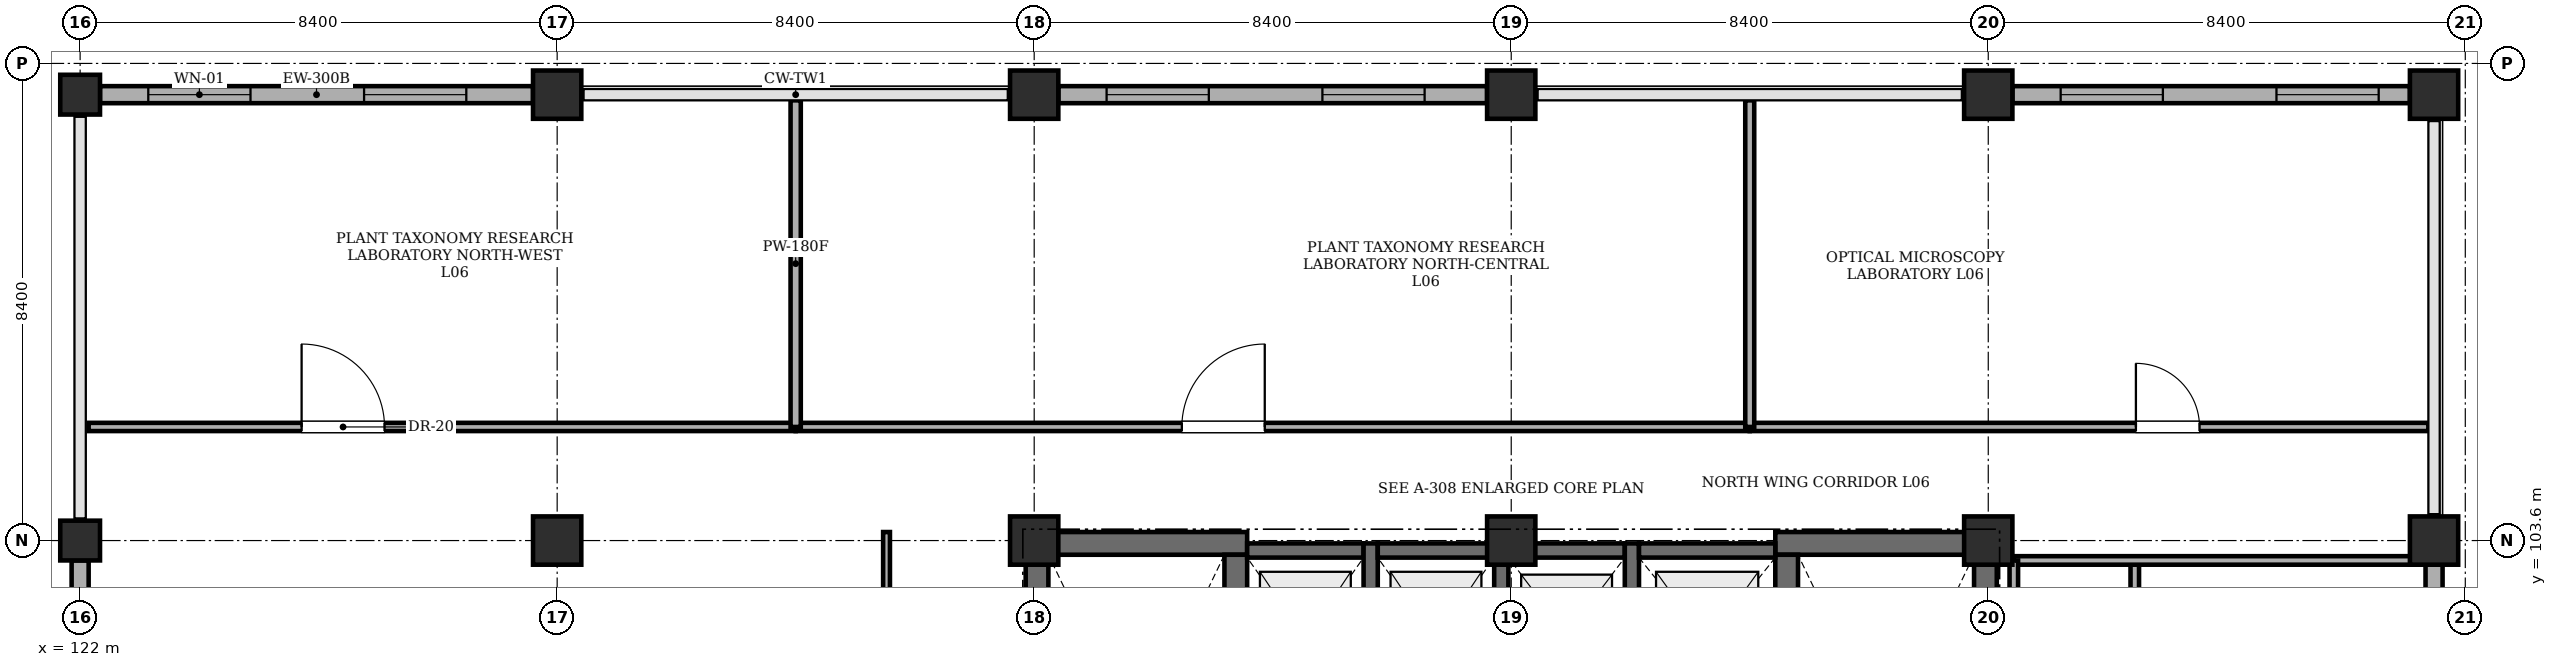
"""IFC4 building model, lengths in metres.
Left out: names, types, materials, properties, quantities, classifications, styles, units other than length and angle.
Written with IfcOpenShell. Run it as: python <this file> out.ifc"""

import sys

from ifc_helpers import new_model, si_unit, direction, frame, frame_2d, origin, origin_2d, place, context, subcontext, project, spatial, rectangle, extrude, element, fill, save


model = new_model("IFC4")
c1 = context("Model", 3, precision=1e-05, world=origin(), true_north=direction((0.0, 1.0)))
c2 = subcontext(c1, "Body", "Model", "MODEL_VIEW")
j1 = project(units=[si_unit("LENGTHUNIT", "METRE"), si_unit("PLANEANGLEUNIT", "RADIAN")], contexts=[c1])
p1 = place(None, origin())
s1 = spatial("IfcSite", under=j1, at=p1, CompositionType="ELEMENT")
p2 = place(p1, origin())
s2 = spatial("IfcBuilding", under=s1, at=p2, CompositionType="ELEMENT")
p3 = place(p2, frame((0.0, 0.0, 23.4)))
s3 = spatial("IfcBuildingStorey", under=s2, at=p3, CompositionType="ELEMENT", Elevation=23.4)
for number, where, z_axis, x_axis in (
    (1, (122.0, 103.6, 0.0), (0.0, 0.0, 1.0), (1.0, 0.0, 0.0)),
    (2, (122.0, 111.45, 0.0), (0.0, 0.0, 1.0), (1.0, 0.0, 0.0)),
):
    element("IfcColumn", number, at=place(p3, frame(where, z_axis=z_axis, x_axis=x_axis)), inside=s3, PredefinedType="COLUMN", context=c2, shape_type="SweptSolid", body=[
        extrude(rectangle(XDim=0.7, YDim=0.7, at=origin_2d()), origin(), (0.0, 0.0, 1.0), 4.0),
    ])
for number, where, z_axis, x_axis in (
    (3, (130.4, 103.6, 0.0), (0.0, 0.0, 1.0), (1.0, 0.0, 0.0)),
    (4, (130.4, 111.45, 0.0), (0.0, 0.0, 1.0), (1.0, 0.0, 0.0)),
    (5, (138.8, 103.6, 0.0), (0.0, 0.0, 1.0), (1.0, 0.0, 0.0)),
    (6, (138.8, 111.45, 0.0), (0.0, 0.0, 1.0), (1.0, 0.0, 0.0)),
    (7, (147.2, 103.6, 0.0), (0.0, 0.0, 1.0), (1.0, 0.0, 0.0)),
    (8, (147.2, 111.45, 0.0), (0.0, 0.0, 1.0), (1.0, 0.0, 0.0)),
    (9, (155.6, 103.6, 0.0), (0.0, 0.0, 1.0), (1.0, 0.0, 0.0)),
    (10, (155.6, 111.45, 0.0), (0.0, 0.0, 1.0), (1.0, 0.0, 0.0)),
    (11, (163.45, 103.6, 0.0), (0.0, 0.0, 1.0), (1.0, 0.0, 0.0)),
    (12, (163.45, 111.45, 0.0), (0.0, 0.0, 1.0), (1.0, 0.0, 0.0)),
):
    element("IfcColumn", number, at=place(p3, frame(where, z_axis=z_axis, x_axis=x_axis)), inside=s3, PredefinedType="COLUMN", context=c2, shape_type="SweptSolid", body=[
        extrude(rectangle(XDim=0.85, YDim=0.85, at=origin_2d()), origin(), (0.0, 0.0, 1.0), 4.0),
    ])
p4 = place(p3, frame((138.65, 103.55, 0.0), z_axis=(0.0, 0.0, 1.0), x_axis=(1.0, 0.0, 0.0)))
e13 = element("IfcWall", 13, at=p4, inside=s3, PredefinedType="SHEAR", context=c2, shape_type="SweptSolid", body=[
    extrude(rectangle(XDim=3.9, YDim=0.4, at=frame_2d((1.95, 0.0))), origin(), (0.0, 0.0, 1.0), 4.0),
])
p5 = place(p3, frame((138.85, 95.45, 0.0), z_axis=(0.0, 0.0, 1.0), x_axis=(0.0, 1.0, 0.0)))
e14 = element("IfcWall", 14, at=p5, inside=s3, PredefinedType="SHEAR", context=c2, shape_type="SweptSolid", body=[
    extrude(rectangle(XDim=7.9, YDim=0.4, at=frame_2d((3.95, 0.0))), origin(), (0.0, 0.0, 1.0), 4.0),
])
p6 = place(p3, frame((142.35, 95.45, 0.0), z_axis=(0.0, 0.0, 1.0), x_axis=(0.0, 1.0, 0.0)))
e15 = element("IfcWall", 15, at=p6, inside=s3, PredefinedType="SHEAR", context=c2, shape_type="SweptSolid", body=[
    extrude(rectangle(XDim=7.9, YDim=0.4, at=frame_2d((3.95, 0.0))), origin(), (0.0, 0.0, 1.0), 4.0),
])
p7 = place(p6, frame((0.22, 0.0, 0.0)))
e16 = element("IfcOpeningElement", 16, at=p7, cuts=e15, PredefinedType="OPENING", context=c2, shape_type="SweptSolid", body=[
    extrude(rectangle(XDim=1.15, YDim=2.15, at=frame_2d((0.575, 1.075))), frame((0.0, 0.21, 0.0), z_axis=(0.0, -1.0, 0.0), x_axis=(1.0, 0.0, 0.0)), (0.0, 0.0, 1.0), 0.42),
])
p8 = place(p3, frame((151.85, 103.55, 0.0), z_axis=(0.0, 0.0, 1.0), x_axis=(1.0, 0.0, 0.0)))
e17 = element("IfcWall", 17, at=p8, inside=s3, PredefinedType="SHEAR", context=c2, shape_type="SweptSolid", body=[
    extrude(rectangle(XDim=3.9, YDim=0.4, at=frame_2d((1.95, 0.0))), origin(), (0.0, 0.0, 1.0), 4.0),
])
p9 = place(p3, frame((152.05, 95.45, 0.0), z_axis=(0.0, 0.0, 1.0), x_axis=(0.0, 1.0, 0.0)))
e18 = element("IfcWall", 18, at=p9, inside=s3, PredefinedType="SHEAR", context=c2, shape_type="SweptSolid", body=[
    extrude(rectangle(XDim=7.9, YDim=0.4, at=frame_2d((3.95, 0.0))), origin(), (0.0, 0.0, 1.0), 4.0),
])
p10 = place(p9, frame((0.35, 0.0, 0.0)))
e19 = element("IfcOpeningElement", 19, at=p10, cuts=e18, PredefinedType="OPENING", context=c2, shape_type="SweptSolid", body=[
    extrude(rectangle(XDim=1.15, YDim=2.15, at=frame_2d((0.575, 1.075))), frame((0.0, 0.21, 0.0), z_axis=(0.0, -1.0, 0.0), x_axis=(1.0, 0.0, 0.0)), (0.0, 0.0, 1.0), 0.42),
])
p11 = place(p3, frame((155.55, 95.45, 0.0), z_axis=(0.0, 0.0, 1.0), x_axis=(0.0, 1.0, 0.0)))
e20 = element("IfcWall", 20, at=p11, inside=s3, PredefinedType="SHEAR", context=c2, shape_type="SweptSolid", body=[
    extrude(rectangle(XDim=7.9, YDim=0.4, at=frame_2d((3.95, 0.0))), origin(), (0.0, 0.0, 1.0), 4.0),
])
p12 = place(p3, frame((142.55, 103.425, 0.0), z_axis=(0.0, 0.0, 1.0), x_axis=(1.0, 0.0, 0.0)))
e21 = element("IfcWall", 21, at=p12, inside=s3, PredefinedType="SHEAR", context=c2, shape_type="SweptSolid", body=[
    extrude(rectangle(XDim=2.05, YDim=0.25, at=frame_2d((1.025, 0.0))), origin(), (0.0, 0.0, 1.0), 4.0),
])
p13 = place(p3, frame((144.725, 100.15, 0.0), z_axis=(0.0, 0.0, 1.0), x_axis=(0.0, 1.0, 0.0)))
e22 = element("IfcWall", 22, at=p13, inside=s3, PredefinedType="SHEAR", context=c2, shape_type="SweptSolid", body=[
    extrude(rectangle(XDim=3.4, YDim=0.25, at=frame_2d((1.7, 0.0))), origin(), (0.0, 0.0, 1.0), 4.0),
])
p14 = place(p3, frame((144.85, 103.425, 0.0), z_axis=(0.0, 0.0, 1.0), x_axis=(1.0, 0.0, 0.0)))
e23 = element("IfcWall", 23, at=p14, inside=s3, PredefinedType="SHEAR", context=c2, shape_type="SweptSolid", body=[
    extrude(rectangle(XDim=2.05, YDim=0.25, at=frame_2d((1.025, 0.0))), origin(), (0.0, 0.0, 1.0), 4.0),
])
p15 = place(p3, frame((147.025, 100.15, 0.0), z_axis=(0.0, 0.0, 1.0), x_axis=(0.0, 1.0, 0.0)))
e24 = element("IfcWall", 24, at=p15, inside=s3, PredefinedType="SHEAR", context=c2, shape_type="SweptSolid", body=[
    extrude(rectangle(XDim=3.4, YDim=0.25, at=frame_2d((1.7, 0.0))), origin(), (0.0, 0.0, 1.0), 4.0),
])
p16 = place(p3, frame((147.15, 103.425, 0.0), z_axis=(0.0, 0.0, 1.0), x_axis=(1.0, 0.0, 0.0)))
e25 = element("IfcWall", 25, at=p16, inside=s3, PredefinedType="SHEAR", context=c2, shape_type="SweptSolid", body=[
    extrude(rectangle(XDim=2.05, YDim=0.25, at=frame_2d((1.025, 0.0))), origin(), (0.0, 0.0, 1.0), 4.0),
])
p17 = place(p3, frame((149.325, 100.35, 0.0), z_axis=(0.0, 0.0, 1.0), x_axis=(0.0, 1.0, 0.0)))
e26 = element("IfcWall", 26, at=p17, inside=s3, PredefinedType="SHEAR", context=c2, shape_type="SweptSolid", body=[
    extrude(rectangle(XDim=3.2, YDim=0.25, at=frame_2d((1.6, 0.0))), origin(), (0.0, 0.0, 1.0), 4.0),
])
p18 = place(p3, frame((149.45, 103.425, 0.0), z_axis=(0.0, 0.0, 1.0), x_axis=(1.0, 0.0, 0.0)))
e27 = element("IfcWall", 27, at=p18, inside=s3, PredefinedType="SHEAR", context=c2, shape_type="SweptSolid", body=[
    extrude(rectangle(XDim=2.4, YDim=0.25, at=frame_2d((1.2, 0.0))), origin(), (0.0, 0.0, 1.0), 4.0),
])
p19 = place(p3, frame((122.35, 111.45, 0.0), z_axis=(0.0, 0.0, 1.0), x_axis=(1.0, 0.0, 0.0)))
e28 = element("IfcWall", 28, at=p19, inside=s3, PredefinedType="STANDARD", context=c2, shape_type="SweptSolid", body=[
    extrude(rectangle(XDim=7.625, YDim=0.3, at=frame_2d((3.812, 0.0))), origin(), (0.0, 0.0, 1.0), 3.3),
])
p20 = place(p19, frame((0.85, 0.0, 0.9)))
e29 = element("IfcOpeningElement", 29, at=p20, cuts=e28, PredefinedType="OPENING", context=c2, shape_type="SweptSolid", body=[
    extrude(rectangle(XDim=1.8, YDim=2.1, at=frame_2d((0.9, 1.05))), frame((0.0, 0.16, 0.0), z_axis=(0.0, -1.0, 0.0), x_axis=(1.0, 0.0, 0.0)), (0.0, 0.0, 1.0), 0.32),
])
p21 = place(p19, frame((4.65, 0.0, 0.9)))
e30 = element("IfcOpeningElement", 30, at=p21, cuts=e28, PredefinedType="OPENING", context=c2, shape_type="SweptSolid", body=[
    extrude(rectangle(XDim=1.8, YDim=2.1, at=frame_2d((0.9, 1.05))), frame((0.0, 0.16, 0.0), z_axis=(0.0, -1.0, 0.0), x_axis=(1.0, 0.0, 0.0)), (0.0, 0.0, 1.0), 0.32),
])
p22 = place(p3, frame((139.225, 111.45, 0.0), z_axis=(0.0, 0.0, 1.0), x_axis=(1.0, 0.0, 0.0)))
e31 = element("IfcWall", 31, at=p22, inside=s3, PredefinedType="STANDARD", context=c2, shape_type="SweptSolid", body=[
    extrude(rectangle(XDim=7.55, YDim=0.3, at=frame_2d((3.775, 0.0))), origin(), (0.0, 0.0, 1.0), 3.3),
])
p23 = place(p22, frame((0.85, 0.0, 0.9)))
e32 = element("IfcOpeningElement", 32, at=p23, cuts=e31, PredefinedType="OPENING", context=c2, shape_type="SweptSolid", body=[
    extrude(rectangle(XDim=1.8, YDim=2.1, at=frame_2d((0.9, 1.05))), frame((0.0, 0.16, 0.0), z_axis=(0.0, -1.0, 0.0), x_axis=(1.0, 0.0, 0.0)), (0.0, 0.0, 1.0), 0.32),
])
p24 = place(p22, frame((4.65, 0.0, 0.9)))
e33 = element("IfcOpeningElement", 33, at=p24, cuts=e31, PredefinedType="OPENING", context=c2, shape_type="SweptSolid", body=[
    extrude(rectangle(XDim=1.8, YDim=2.1, at=frame_2d((0.9, 1.05))), frame((0.0, 0.16, 0.0), z_axis=(0.0, -1.0, 0.0), x_axis=(1.0, 0.0, 0.0)), (0.0, 0.0, 1.0), 0.32),
])
p25 = place(p3, frame((156.025, 111.45, 0.0), z_axis=(0.0, 0.0, 1.0), x_axis=(1.0, 0.0, 0.0)))
e34 = element("IfcWall", 34, at=p25, inside=s3, PredefinedType="STANDARD", context=c2, shape_type="SweptSolid", body=[
    extrude(rectangle(XDim=7.0, YDim=0.3, at=frame_2d((3.5, 0.0))), origin(), (0.0, 0.0, 1.0), 3.3),
])
p26 = place(p25, frame((0.85, 0.0, 0.9)))
e35 = element("IfcOpeningElement", 35, at=p26, cuts=e34, PredefinedType="OPENING", context=c2, shape_type="SweptSolid", body=[
    extrude(rectangle(XDim=1.8, YDim=2.1, at=frame_2d((0.9, 1.05))), frame((0.0, 0.16, 0.0), z_axis=(0.0, -1.0, 0.0), x_axis=(1.0, 0.0, 0.0)), (0.0, 0.0, 1.0), 0.32),
])
p27 = place(p25, frame((4.65, 0.0, 0.9)))
e36 = element("IfcOpeningElement", 36, at=p27, cuts=e34, PredefinedType="OPENING", context=c2, shape_type="SweptSolid", body=[
    extrude(rectangle(XDim=1.8, YDim=2.1, at=frame_2d((0.9, 1.05))), frame((0.0, 0.16, 0.0), z_axis=(0.0, -1.0, 0.0), x_axis=(1.0, 0.0, 0.0)), (0.0, 0.0, 1.0), 0.32),
])
p28 = place(p3, frame((163.45, 103.175, 0.0), z_axis=(0.0, 0.0, 1.0), x_axis=(0.0, -1.0, 0.0)))
e37 = element("IfcWall", 37, at=p28, inside=s3, PredefinedType="STANDARD", context=c2, shape_type="SweptSolid", body=[
    extrude(rectangle(XDim=7.55, YDim=0.3, at=frame_2d((3.775, 0.0))), origin(), (0.0, 0.0, 1.0), 3.3),
])
p29 = place(p28, frame((1.15, 0.0, 1.1)))
e38 = element("IfcOpeningElement", 38, at=p29, cuts=e37, PredefinedType="OPENING", context=c2, shape_type="SweptSolid", body=[
    extrude(rectangle(XDim=1.4, YDim=1.4, at=frame_2d((0.7, 0.7))), frame((0.0, 0.16, 0.0), z_axis=(0.0, -1.0, 0.0), x_axis=(1.0, 0.0, 0.0)), (0.0, 0.0, 1.0), 0.32),
])
p30 = place(p3, frame((122.0, 95.55, 0.0), z_axis=(0.0, 0.0, 1.0), x_axis=(0.0, 1.0, 0.0)))
e39 = element("IfcWall", 39, at=p30, inside=s3, PredefinedType="STANDARD", context=c2, shape_type="SweptSolid", body=[
    extrude(rectangle(XDim=7.7, YDim=0.3, at=frame_2d((3.85, 0.0))), origin(), (0.0, 0.0, 1.0), 3.3),
])
p31 = place(p30, frame((2.4, 0.0, 1.0)))
e40 = element("IfcOpeningElement", 40, at=p31, cuts=e39, PredefinedType="OPENING", context=c2, shape_type="SweptSolid", body=[
    extrude(rectangle(XDim=1.8, YDim=1.8, at=frame_2d((0.9, 0.9))), frame((0.0, 0.16, 0.0), z_axis=(0.0, -1.0, 0.0), x_axis=(1.0, 0.0, 0.0)), (0.0, 0.0, 1.0), 0.32),
])
p32 = place(p3, frame((158.18, 94.68, 0.0), z_axis=(0.0, 0.0, 1.0), x_axis=(0.0, 1.0, 0.0)))
e41 = element("IfcWall", 41, at=p32, inside=s3, PredefinedType="PARTITIONING", context=c2, shape_type="SweptSolid", body=[
    extrude(rectangle(XDim=8.57, YDim=0.15, at=frame_2d((4.285, 0.0))), origin(), (0.0, 0.0, 1.0), 4.0),
])
p33 = place(p32, frame((0.8, 0.0, 0.0)))
e42 = element("IfcOpeningElement", 42, at=p33, cuts=e41, PredefinedType="OPENING", context=c2, shape_type="SweptSolid", body=[
    extrude(rectangle(XDim=1.0, YDim=2.12, at=frame_2d((0.5, 1.06))), frame((0.0, 0.085, 0.0), z_axis=(0.0, -1.0, 0.0), x_axis=(1.0, 0.0, 0.0)), (0.0, 0.0, 1.0), 0.17),
])
p34 = place(p32, frame((3.5, 0.0, 0.0)))
e43 = element("IfcOpeningElement", 43, at=p34, cuts=e41, PredefinedType="OPENING", context=c2, shape_type="SweptSolid", body=[
    extrude(rectangle(XDim=0.92, YDim=2.1, at=frame_2d((0.46, 1.05))), frame((0.0, 0.085, 0.0), z_axis=(0.0, -1.0, 0.0), x_axis=(1.0, 0.0, 0.0)), (0.0, 0.0, 1.0), 0.17),
])
p35 = place(p32, frame((6.4, 0.0, 0.0)))
e44 = element("IfcOpeningElement", 44, at=p35, cuts=e41, PredefinedType="OPENING", context=c2, shape_type="SweptSolid", body=[
    extrude(rectangle(XDim=0.92, YDim=2.1, at=frame_2d((0.46, 1.05))), frame((0.0, 0.085, 0.0), z_axis=(0.0, -1.0, 0.0), x_axis=(1.0, 0.0, 0.0)), (0.0, 0.0, 1.0), 0.17),
])
p36 = place(p3, frame((156.05, 103.25, 0.0), z_axis=(0.0, 0.0, 1.0), x_axis=(1.0, 0.0, 0.0)))
e45 = element("IfcWall", 45, at=p36, inside=s3, PredefinedType="PARTITIONING", context=c2, shape_type="SweptSolid", body=[
    extrude(rectangle(XDim=7.15, YDim=0.15, at=frame_2d((3.575, 0.0))), origin(), (0.0, 0.0, 1.0), 4.0),
])
p37 = place(p3, frame((156.05, 94.68, 0.0), z_axis=(0.0, 0.0, 1.0), x_axis=(0.0, 1.0, 0.0)))
e46 = element("IfcWall", 46, at=p37, inside=s3, PredefinedType="PARTITIONING", context=c2, shape_type="SweptSolid", body=[
    extrude(rectangle(XDim=8.57, YDim=0.15, at=frame_2d((4.285, 0.0))), origin(), (0.0, 0.0, 1.0), 4.0),
])
p38 = place(p3, frame((136.2, 94.68, 0.0), z_axis=(0.0, 0.0, 1.0), x_axis=(0.0, 1.0, 0.0)))
e47 = element("IfcWall", 47, at=p38, inside=s3, PredefinedType="PARTITIONING", context=c2, shape_type="SweptSolid", body=[
    extrude(rectangle(XDim=9.07, YDim=0.12, at=frame_2d((4.535, 0.0))), origin(), (0.0, 0.0, 1.0), 4.0),
])
p39 = place(p3, frame((122.15, 105.6, 0.0), z_axis=(0.0, 0.0, 1.0), x_axis=(1.0, 0.0, 0.0)))
e48 = element("IfcWall", 48, at=p39, inside=s3, PredefinedType="PARTITIONING", context=c2, shape_type="SweptSolid", body=[
    extrude(rectangle(XDim=12.45, YDim=0.145, at=frame_2d((6.225, 0.0))), origin(), (0.0, 0.0, 1.0), 4.0),
])
p40 = place(p39, frame((3.75, 0.0, 0.0)))
e49 = element("IfcOpeningElement", 49, at=p40, cuts=e48, PredefinedType="OPENING", context=c2, shape_type="SweptSolid", body=[
    extrude(rectangle(XDim=1.46, YDim=2.22, at=frame_2d((0.73, 1.11))), frame((0.0, 0.083, 0.0), z_axis=(0.0, -1.0, 0.0), x_axis=(1.0, 0.0, 0.0)), (0.0, 0.0, 1.0), 0.165),
])
p41 = place(p3, frame((134.6, 105.6, 0.0), z_axis=(0.0, 0.0, 1.0), x_axis=(1.0, 0.0, 0.0)))
e50 = element("IfcWall", 50, at=p41, inside=s3, PredefinedType="PARTITIONING", context=c2, shape_type="SweptSolid", body=[
    extrude(rectangle(XDim=16.8, YDim=0.145, at=frame_2d((8.4, 0.0))), origin(), (0.0, 0.0, 1.0), 4.0),
])
p42 = place(p41, frame((6.8, 0.0, 0.0)))
e51 = element("IfcOpeningElement", 51, at=p42, cuts=e50, PredefinedType="OPENING", context=c2, shape_type="SweptSolid", body=[
    extrude(rectangle(XDim=1.46, YDim=2.22, at=frame_2d((0.73, 1.11))), frame((0.0, 0.083, 0.0), z_axis=(0.0, -1.0, 0.0), x_axis=(1.0, 0.0, 0.0)), (0.0, 0.0, 1.0), 0.165),
])
p43 = place(p3, frame((134.6, 105.6, 0.0), z_axis=(0.0, 0.0, 1.0), x_axis=(0.0, 1.0, 0.0)))
e52 = element("IfcWall", 52, at=p43, inside=s3, PredefinedType="STANDARD", context=c2, shape_type="SweptSolid", body=[
    extrude(rectangle(XDim=5.75, YDim=0.18, at=frame_2d((2.875, 0.0))), origin(), (0.0, 0.0, 1.0), 3.5),
])
p44 = place(p3, frame((151.4, 105.6, 0.0), z_axis=(0.0, 0.0, 1.0), x_axis=(1.0, 0.0, 0.0)))
e53 = element("IfcWall", 53, at=p44, inside=s3, PredefinedType="PARTITIONING", context=c2, shape_type="SweptSolid", body=[
    extrude(rectangle(XDim=11.95, YDim=0.145, at=frame_2d((5.975, 0.0))), origin(), (0.0, 0.0, 1.0), 4.0),
])
p45 = place(p44, frame((6.8, 0.0, 0.0)))
e54 = element("IfcOpeningElement", 54, at=p45, cuts=e53, PredefinedType="OPENING", context=c2, shape_type="SweptSolid", body=[
    extrude(rectangle(XDim=1.12, YDim=2.18, at=frame_2d((0.56, 1.09))), frame((0.0, 0.083, 0.0), z_axis=(0.0, -1.0, 0.0), x_axis=(1.0, 0.0, 0.0)), (0.0, 0.0, 1.0), 0.165),
])
p46 = place(p3, frame((151.4, 105.6, 0.0), z_axis=(0.0, 0.0, 1.0), x_axis=(0.0, 1.0, 0.0)))
e55 = element("IfcWall", 55, at=p46, inside=s3, PredefinedType="PARTITIONING", context=c2, shape_type="SweptSolid", body=[
    extrude(rectangle(XDim=5.75, YDim=0.158, at=frame_2d((2.875, 0.0))), origin(), (0.0, 0.0, 1.0), 3.5),
])
p47 = place(p20, origin())
e56 = element("IfcWindow", 56, at=p47, inside=s3, PartitioningType="DOUBLE_PANEL_VERTICAL", PredefinedType="WINDOW", context=c2, shape_type="SweptSolid", body=[
    extrude(rectangle(XDim=1.8, YDim=2.1, at=frame_2d((0.9, 1.05))), frame((0.0, 0.03, 0.0), z_axis=(0.0, -1.0, 0.0), x_axis=(1.0, 0.0, 0.0)), (0.0, 0.0, 1.0), 0.06),
])
fill(e29, e56)
p48 = place(p21, origin())
e57 = element("IfcWindow", 57, at=p48, inside=s3, PartitioningType="DOUBLE_PANEL_VERTICAL", PredefinedType="WINDOW", context=c2, shape_type="SweptSolid", body=[
    extrude(rectangle(XDim=1.8, YDim=2.1, at=frame_2d((0.9, 1.05))), frame((0.0, 0.03, 0.0), z_axis=(0.0, -1.0, 0.0), x_axis=(1.0, 0.0, 0.0)), (0.0, 0.0, 1.0), 0.06),
])
fill(e30, e57)
p49 = place(p23, origin())
e58 = element("IfcWindow", 58, at=p49, inside=s3, PartitioningType="DOUBLE_PANEL_VERTICAL", PredefinedType="WINDOW", context=c2, shape_type="SweptSolid", body=[
    extrude(rectangle(XDim=1.8, YDim=2.1, at=frame_2d((0.9, 1.05))), frame((0.0, 0.03, 0.0), z_axis=(0.0, -1.0, 0.0), x_axis=(1.0, 0.0, 0.0)), (0.0, 0.0, 1.0), 0.06),
])
fill(e32, e58)
p50 = place(p24, origin())
e59 = element("IfcWindow", 59, at=p50, inside=s3, PartitioningType="DOUBLE_PANEL_VERTICAL", PredefinedType="WINDOW", context=c2, shape_type="SweptSolid", body=[
    extrude(rectangle(XDim=1.8, YDim=2.1, at=frame_2d((0.9, 1.05))), frame((0.0, 0.03, 0.0), z_axis=(0.0, -1.0, 0.0), x_axis=(1.0, 0.0, 0.0)), (0.0, 0.0, 1.0), 0.06),
])
fill(e33, e59)
p51 = place(p26, origin())
e60 = element("IfcWindow", 60, at=p51, inside=s3, PartitioningType="DOUBLE_PANEL_VERTICAL", PredefinedType="WINDOW", context=c2, shape_type="SweptSolid", body=[
    extrude(rectangle(XDim=1.8, YDim=2.1, at=frame_2d((0.9, 1.05))), frame((0.0, 0.03, 0.0), z_axis=(0.0, -1.0, 0.0), x_axis=(1.0, 0.0, 0.0)), (0.0, 0.0, 1.0), 0.06),
])
fill(e35, e60)
p52 = place(p27, origin())
e61 = element("IfcWindow", 61, at=p52, inside=s3, PartitioningType="DOUBLE_PANEL_VERTICAL", PredefinedType="WINDOW", context=c2, shape_type="SweptSolid", body=[
    extrude(rectangle(XDim=1.8, YDim=2.1, at=frame_2d((0.9, 1.05))), frame((0.0, 0.03, 0.0), z_axis=(0.0, -1.0, 0.0), x_axis=(1.0, 0.0, 0.0)), (0.0, 0.0, 1.0), 0.06),
])
fill(e36, e61)
p53 = place(p40, origin())
e62 = element("IfcDoor", 62, at=p53, inside=s3, OperationType="SINGLE_SWING_LEFT", PredefinedType="DOOR", context=c2, shape_type="SweptSolid", body=[
    extrude(rectangle(XDim=1.46, YDim=2.22, at=frame_2d((0.73, 1.11))), frame((0.0, 0.025, 0.0), z_axis=(0.0, -1.0, 0.0), x_axis=(1.0, 0.0, 0.0)), (0.0, 0.0, 1.0), 0.05),
])
fill(e49, e62)
p54 = place(p42, origin())
e63 = element("IfcDoor", 63, at=p54, inside=s3, OperationType="SINGLE_SWING_RIGHT", PredefinedType="DOOR", context=c2, shape_type="SweptSolid", body=[
    extrude(rectangle(XDim=1.46, YDim=2.22, at=frame_2d((0.73, 1.11))), frame((0.0, 0.025, 0.0), z_axis=(0.0, -1.0, 0.0), x_axis=(1.0, 0.0, 0.0)), (0.0, 0.0, 1.0), 0.05),
])
fill(e51, e63)
p55 = place(p45, origin())
e64 = element("IfcDoor", 64, at=p55, inside=s3, OperationType="SINGLE_SWING_LEFT", PredefinedType="DOOR", context=c2, shape_type="SweptSolid", body=[
    extrude(rectangle(XDim=1.12, YDim=2.18, at=frame_2d((0.56, 1.09))), frame((0.0, 0.025, 0.0), z_axis=(0.0, -1.0, 0.0), x_axis=(1.0, 0.0, 0.0)), (0.0, 0.0, 1.0), 0.05),
])
fill(e54, e64)
save(model, sys.argv[1])
